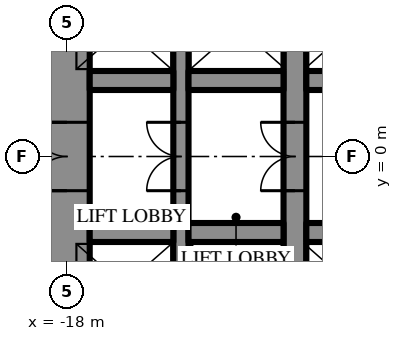
"""IFC4 building model, lengths in metres.
Left out: names, types, materials, properties, quantities, classifications, styles, units other than length and angle.
Written with IfcOpenShell. Run it as: python <this file> out.ifc"""

import sys

from ifc_helpers import new_model, si_unit, direction, frame, frame_2d, origin, place, context, subcontext, project, spatial, rectangle, extrude, element, fill, save


model = new_model("IFC4")
c1 = context("Model", 3, precision=1e-05, world=origin(), true_north=direction((0.0, 1.0)))
c2 = subcontext(c1, "Body", "Model", "MODEL_VIEW")
j1 = project(units=[si_unit("LENGTHUNIT", "METRE"), si_unit("PLANEANGLEUNIT", "RADIAN")], contexts=[c1])
p1 = place(None, origin())
s1 = spatial("IfcSite", under=j1, at=p1, CompositionType="ELEMENT")
p2 = place(p1, origin())
s2 = spatial("IfcBuilding", under=s1, at=p2, CompositionType="ELEMENT")
p3 = place(p2, frame((0.0, 0.0, 27.7)))
s3 = spatial("IfcBuildingStorey", under=s2, at=p3, CompositionType="ELEMENT", Elevation=27.7)
p4 = place(p3, frame((-18.0, 10.7, 0.0), z_axis=(0.0, 0.0, 1.0), x_axis=(0.0, -1.0, 0.0)))
e1 = element("IfcWall", 1, at=p4, inside=s3, PredefinedType="SHEAR", context=c2, shape_type="SweptSolid", body=[
    extrude(rectangle(XDim=21.4, YDim=1.2, at=frame_2d((10.7, 0.0))), origin(), (0.0, 0.0, 1.0), 4.2),
])
p5 = place(p4, frame((9.8, 0.0, 0.0)))
e2 = element("IfcOpeningElement", 2, at=p5, cuts=e1, PredefinedType="OPENING", context=c2, shape_type="SweptSolid", body=[
    extrude(rectangle(XDim=1.8, YDim=2.4, at=frame_2d((0.9, 1.2))), frame((0.0, 0.61, 0.0), z_axis=(0.0, -1.0, 0.0), x_axis=(1.0, 0.0, 0.0)), (0.0, 0.0, 1.0), 1.22),
])
p6 = place(p3, frame((-12.0, -10.7, 0.0), z_axis=(0.0, 0.0, 1.0), x_axis=(0.0, 1.0, 0.0)))
e3 = element("IfcWall", 3, at=p6, inside=s3, PredefinedType="SHEAR", context=c2, shape_type="SweptSolid", body=[
    extrude(rectangle(XDim=21.4, YDim=0.6, at=frame_2d((10.7, 0.0))), origin(), (0.0, 0.0, 1.0), 4.2),
])
p7 = place(p6, frame((9.8, 0.0, 0.0)))
e4 = element("IfcOpeningElement", 4, at=p7, cuts=e3, PredefinedType="OPENING", context=c2, shape_type="SweptSolid", body=[
    extrude(rectangle(XDim=1.8, YDim=2.4, at=frame_2d((0.9, 1.2))), frame((0.0, 0.31, 0.0), z_axis=(0.0, -1.0, 0.0), x_axis=(1.0, 0.0, 0.0)), (0.0, 0.0, 1.0), 0.62),
])
p8 = place(p3, frame((-15.0, -10.7, 0.0), z_axis=(0.0, 0.0, 1.0), x_axis=(0.0, 1.0, 0.0)))
e5 = element("IfcWall", 5, at=p8, inside=s3, PredefinedType="SHEAR", context=c2, shape_type="SweptSolid", body=[
    extrude(rectangle(XDim=21.4, YDim=0.4, at=frame_2d((10.7, 0.0))), origin(), (0.0, 0.0, 1.0), 4.2),
])
p9 = place(p8, frame((9.8, 0.0, 0.0)))
e6 = element("IfcOpeningElement", 6, at=p9, cuts=e5, PredefinedType="OPENING", context=c2, shape_type="SweptSolid", body=[
    extrude(rectangle(XDim=1.8, YDim=2.4, at=frame_2d((0.9, 1.2))), frame((0.0, 0.21, 0.0), z_axis=(0.0, -1.0, 0.0), x_axis=(1.0, 0.0, 0.0)), (0.0, 0.0, 1.0), 0.42),
])
p10 = place(p3, frame((-17.4, 2.0, 0.0), z_axis=(0.0, 0.0, 1.0), x_axis=(1.0, 0.0, 0.0)))
e7 = element("IfcWall", 7, at=p10, inside=s3, PredefinedType="SHEAR", context=c2, shape_type="SweptSolid", body=[
    extrude(rectangle(XDim=2.2, YDim=0.5, at=frame_2d((1.1, 0.0))), origin(), (0.0, 0.0, 1.0), 4.2),
])
p11 = place(p3, frame((-14.8, 2.0, 0.0), z_axis=(0.0, 0.0, 1.0), x_axis=(1.0, 0.0, 0.0)))
e8 = element("IfcWall", 8, at=p11, inside=s3, PredefinedType="SHEAR", context=c2, shape_type="SweptSolid", body=[
    extrude(rectangle(XDim=2.5, YDim=0.5, at=frame_2d((1.25, 0.0))), origin(), (0.0, 0.0, 1.0), 4.2),
])
p12 = place(p3, frame((-11.7, 2.0, 0.0), z_axis=(0.0, 0.0, 1.0), x_axis=(1.0, 0.0, 0.0)))
e9 = element("IfcWall", 9, at=p12, inside=s3, PredefinedType="SHEAR", context=c2, shape_type="SweptSolid", body=[
    extrude(rectangle(XDim=5.9, YDim=0.5, at=frame_2d((2.95, 0.0))), origin(), (0.0, 0.0, 1.0), 4.2),
])
p13 = place(p3, frame((3.2, -2.0, 0.0), z_axis=(0.0, 0.0, 1.0), x_axis=(-1.0, 0.0, 0.0)))
e10 = element("IfcWall", 10, at=p13, inside=s3, PredefinedType="SHEAR", context=c2, shape_type="SweptSolid", body=[
    extrude(rectangle(XDim=14.9, YDim=0.5, at=frame_2d((7.45, 0.0))), origin(), (0.0, 0.0, 1.0), 4.2),
])
p14 = place(p13, frame((1.15, 0.0, 0.0)))
e11 = element("IfcOpeningElement", 11, at=p14, cuts=e10, PredefinedType="OPENING", context=c2, shape_type="SweptSolid", body=[
    extrude(rectangle(XDim=1.1, YDim=2.2, at=frame_2d((0.55, 1.1))), frame((0.0, 0.26, 0.0), z_axis=(0.0, -1.0, 0.0), x_axis=(1.0, 0.0, 0.0)), (0.0, 0.0, 1.0), 0.52),
])
p15 = place(p13, frame((4.15, 0.0, 0.0)))
e12 = element("IfcOpeningElement", 12, at=p15, cuts=e10, PredefinedType="OPENING", context=c2, shape_type="SweptSolid", body=[
    extrude(rectangle(XDim=1.1, YDim=2.2, at=frame_2d((0.55, 1.1))), frame((0.0, 0.26, 0.0), z_axis=(0.0, -1.0, 0.0), x_axis=(1.0, 0.0, 0.0)), (0.0, 0.0, 1.0), 0.52),
])
p16 = place(p13, frame((7.15, 0.0, 0.0)))
e13 = element("IfcOpeningElement", 13, at=p16, cuts=e10, PredefinedType="OPENING", context=c2, shape_type="SweptSolid", body=[
    extrude(rectangle(XDim=1.1, YDim=2.2, at=frame_2d((0.55, 1.1))), frame((0.0, 0.26, 0.0), z_axis=(0.0, -1.0, 0.0), x_axis=(1.0, 0.0, 0.0)), (0.0, 0.0, 1.0), 0.52),
])
p17 = place(p13, frame((10.15, 0.0, 0.0)))
e14 = element("IfcOpeningElement", 14, at=p17, cuts=e10, PredefinedType="OPENING", context=c2, shape_type="SweptSolid", body=[
    extrude(rectangle(XDim=1.1, YDim=2.2, at=frame_2d((0.55, 1.1))), frame((0.0, 0.26, 0.0), z_axis=(0.0, -1.0, 0.0), x_axis=(1.0, 0.0, 0.0)), (0.0, 0.0, 1.0), 0.52),
])
p18 = place(p3, frame((-12.3, -2.0, 0.0), z_axis=(0.0, 0.0, 1.0), x_axis=(-1.0, 0.0, 0.0)))
e15 = element("IfcWall", 15, at=p18, inside=s3, PredefinedType="SHEAR", context=c2, shape_type="SweptSolid", body=[
    extrude(rectangle(XDim=2.5, YDim=0.5, at=frame_2d((1.25, 0.0))), origin(), (0.0, 0.0, 1.0), 4.2),
])
p19 = place(p3, frame((-15.2, -2.0, 0.0), z_axis=(0.0, 0.0, 1.0), x_axis=(-1.0, 0.0, 0.0)))
e16 = element("IfcWall", 16, at=p19, inside=s3, PredefinedType="SHEAR", context=c2, shape_type="SweptSolid", body=[
    extrude(rectangle(XDim=2.2, YDim=0.5, at=frame_2d((1.1, 0.0))), origin(), (0.0, 0.0, 1.0), 4.2),
])
p20 = place(p5, frame((1.8, 0.0, 0.0), z_axis=(0.0, 0.0, 1.0), x_axis=(-1.0, 0.0, 0.0)))
e17 = element("IfcDoor", 17, at=p20, inside=s3, OperationType="DOUBLE_DOOR_SINGLE_SWING", PredefinedType="DOOR", context=c2, shape_type="SweptSolid", body=[
    extrude(rectangle(XDim=1.8, YDim=2.4, at=frame_2d((0.9, 1.2))), frame((0.0, 0.025, 0.0), z_axis=(0.0, -1.0, 0.0), x_axis=(1.0, 0.0, 0.0)), (0.0, 0.0, 1.0), 0.05),
])
fill(e2, e17)
p21 = place(p7, origin())
e18 = element("IfcDoor", 18, at=p21, inside=s3, OperationType="DOUBLE_DOOR_SINGLE_SWING", PredefinedType="DOOR", context=c2, shape_type="SweptSolid", body=[
    extrude(rectangle(XDim=1.8, YDim=2.4, at=frame_2d((0.9, 1.2))), frame((0.0, 0.025, 0.0), z_axis=(0.0, -1.0, 0.0), x_axis=(1.0, 0.0, 0.0)), (0.0, 0.0, 1.0), 0.05),
])
fill(e4, e18)
p22 = place(p9, origin())
e19 = element("IfcDoor", 19, at=p22, inside=s3, OperationType="DOUBLE_DOOR_SINGLE_SWING", PredefinedType="DOOR", context=c2, shape_type="SweptSolid", body=[
    extrude(rectangle(XDim=1.8, YDim=2.4, at=frame_2d((0.9, 1.2))), frame((0.0, 0.025, 0.0), z_axis=(0.0, -1.0, 0.0), x_axis=(1.0, 0.0, 0.0)), (0.0, 0.0, 1.0), 0.05),
])
fill(e6, e19)
save(model, sys.argv[1])
